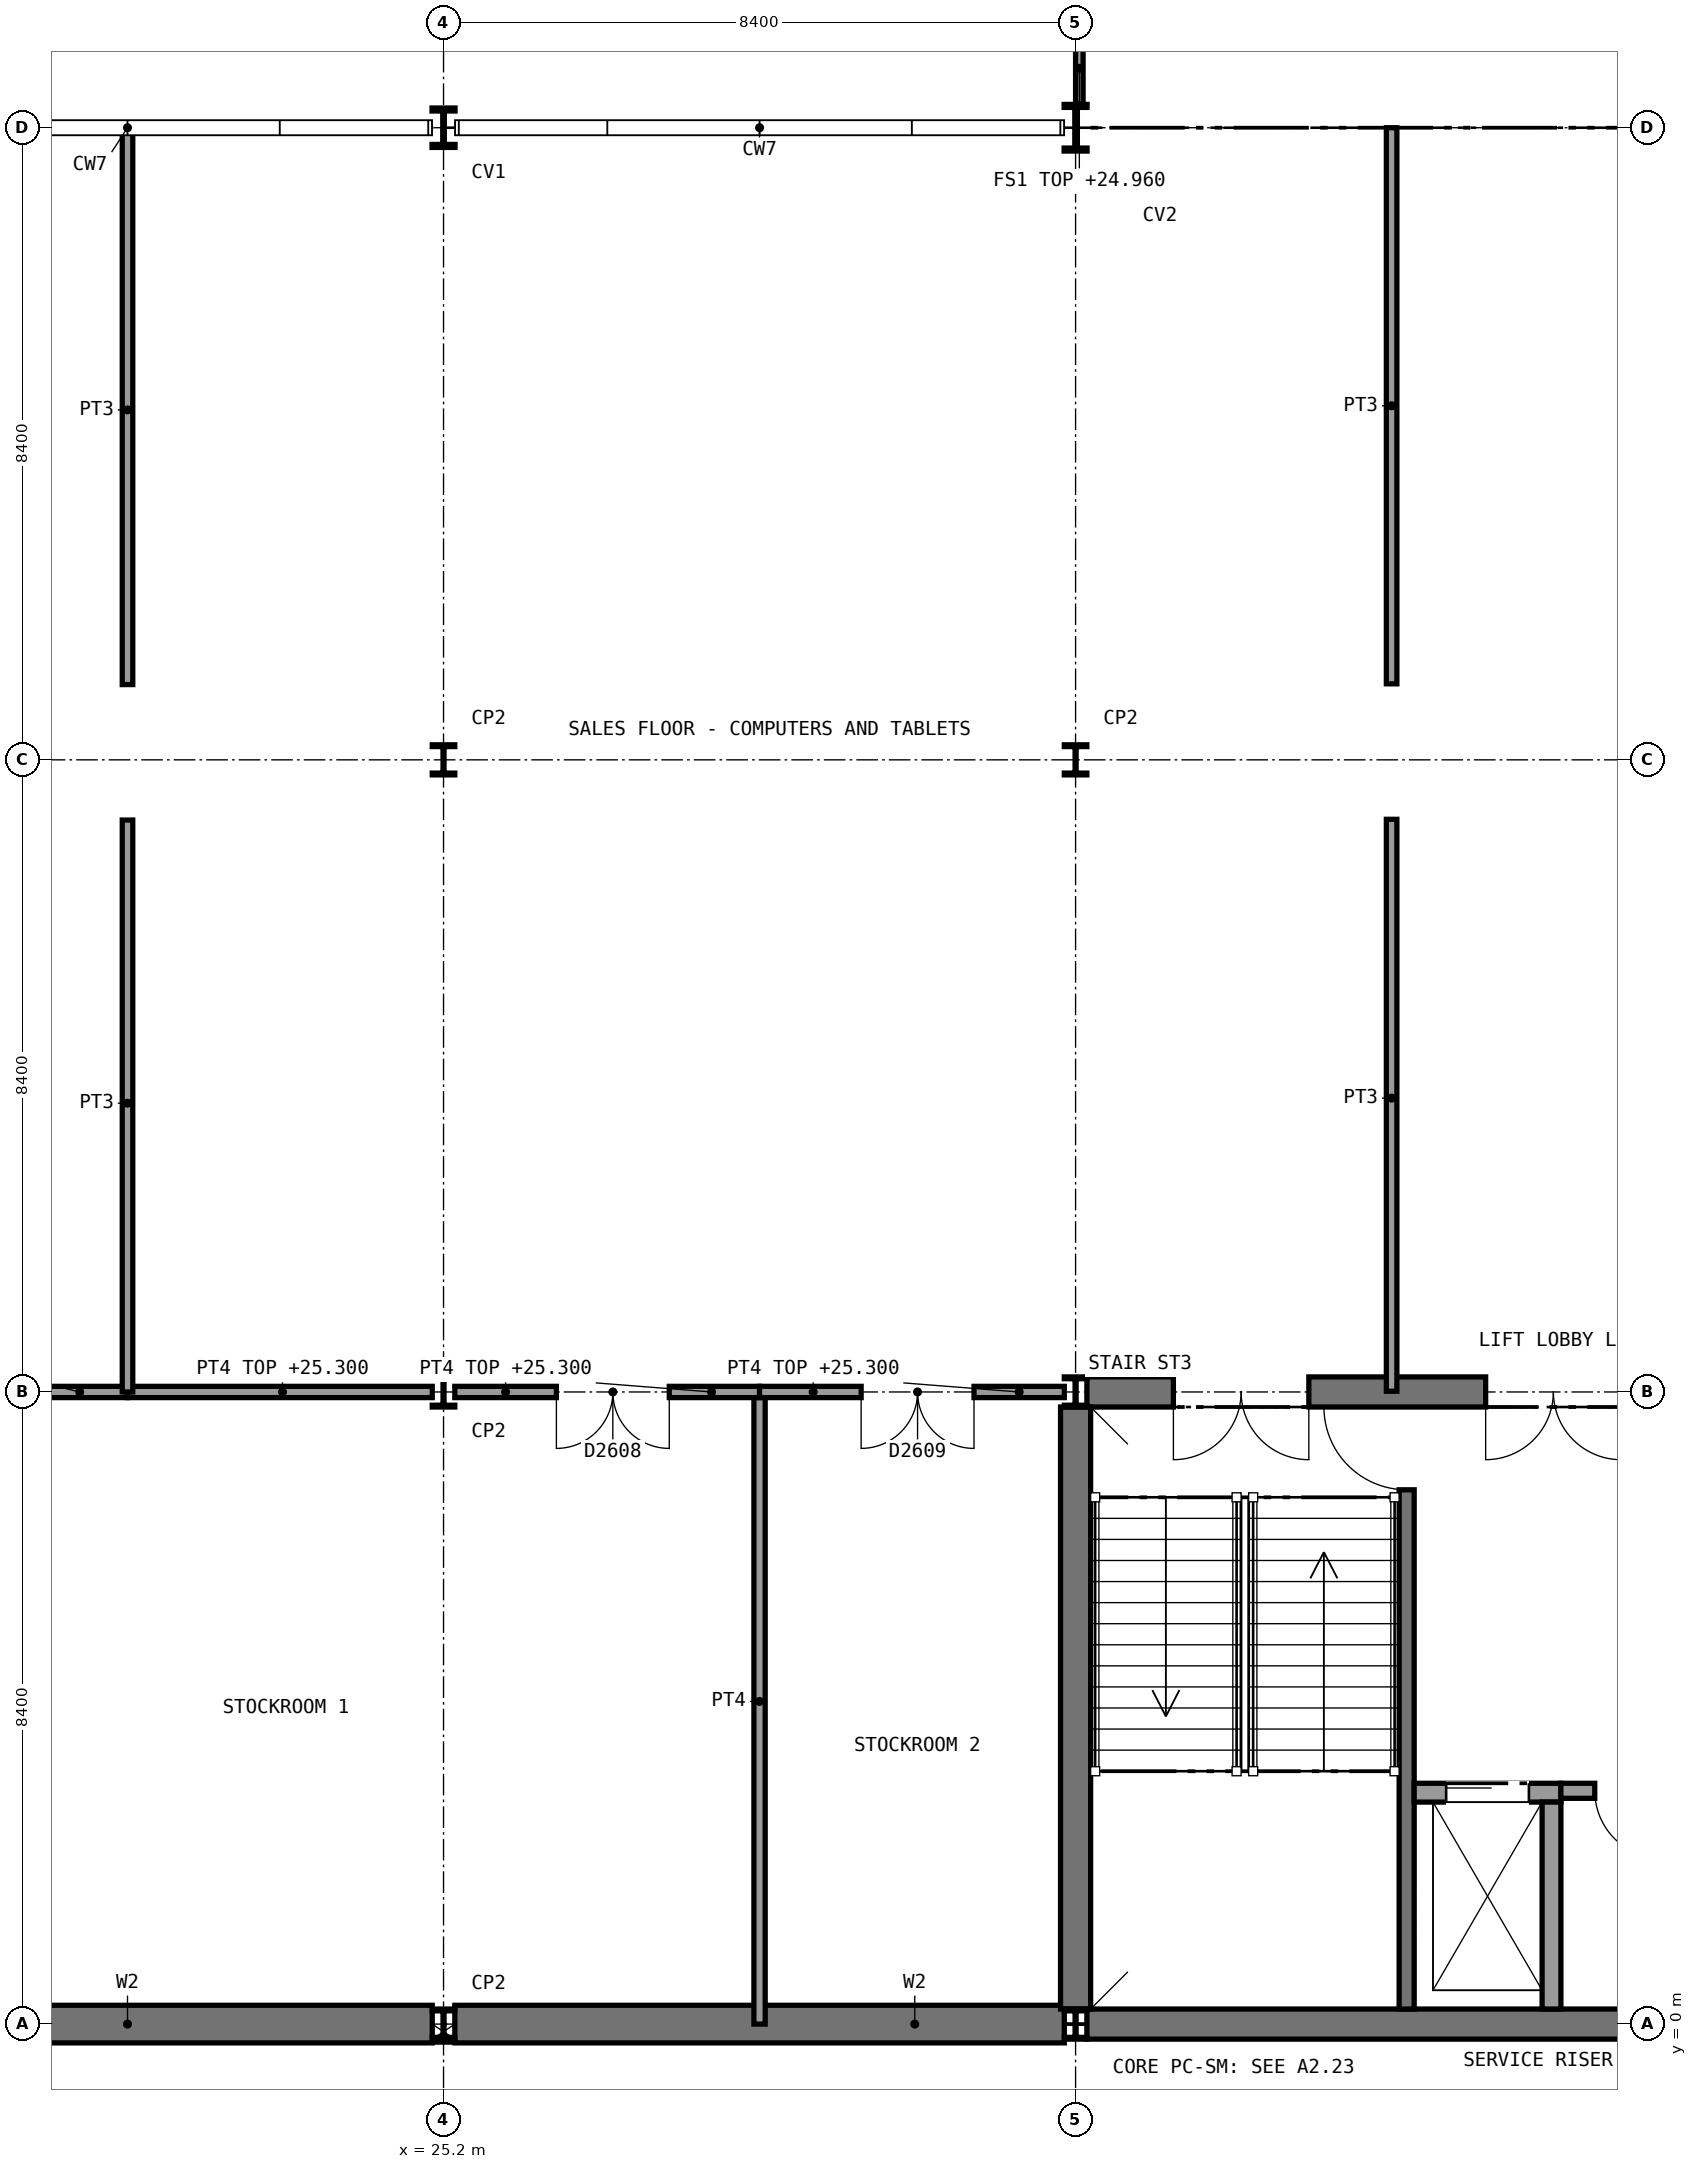
"""IFC4 building model, lengths in metres.
Left out: names, types, materials, properties, quantities, classifications, styles, units other than length and angle.
Written with IfcOpenShell. Run it as: python <this file> out.ifc"""

import sys

from ifc_helpers import new_model, si_unit, direction, frame, frame_2d, origin, origin_2d, place, context, subcontext, project, spatial, rectangle, i_section, extrude, element, fill, save


model = new_model("IFC4")
c1 = context("Model", 3, precision=1e-05, world=origin(), true_north=direction((0.0, 1.0)))
c2 = subcontext(c1, "Body", "Model", "MODEL_VIEW")
j1 = project(units=[si_unit("LENGTHUNIT", "METRE"), si_unit("PLANEANGLEUNIT", "RADIAN")], contexts=[c1])
p1 = place(None, origin())
s1 = spatial("IfcSite", under=j1, at=p1, CompositionType="ELEMENT")
p2 = place(p1, origin())
s2 = spatial("IfcBuilding", under=s1, at=p2, CompositionType="ELEMENT")
p3 = place(p2, frame((0.0, 0.0, 21.0)))
s3 = spatial("IfcBuildingStorey", under=s2, at=p3, CompositionType="ELEMENT", Elevation=21.0)
p4 = place(p3, frame((16.95, 0.0, 0.0), z_axis=(0.0, 0.0, 1.0), x_axis=(1.0, 0.0, 0.0)))
e1 = element("IfcWall", 1, at=p4, inside=s3, PredefinedType="SHEAR", context=c2, shape_type="SweptSolid", body=[
    extrude(rectangle(XDim=8.1, YDim=0.5, at=frame_2d((4.05, 0.0))), origin(), (0.0, 0.0, 1.0), 4.65),
])
p5 = place(p3, frame((25.35, 0.0, 0.0), z_axis=(0.0, 0.0, 1.0), x_axis=(1.0, 0.0, 0.0)))
e2 = element("IfcWall", 2, at=p5, inside=s3, PredefinedType="SHEAR", context=c2, shape_type="SweptSolid", body=[
    extrude(rectangle(XDim=8.1, YDim=0.5, at=frame_2d((4.05, 0.0))), origin(), (0.0, 0.0, 1.0), 4.65),
])
p6 = place(p3, frame((33.75, 0.0, 0.0), z_axis=(0.0, 0.0, 1.0), x_axis=(1.0, 0.0, 0.0)))
e3 = element("IfcWall", 3, at=p6, inside=s3, PredefinedType="SHEAR", context=c2, shape_type="SweptSolid", body=[
    extrude(rectangle(XDim=8.1, YDim=0.4, at=frame_2d((4.05, 0.0))), origin(), (0.0, 0.0, 1.0), 4.65),
])
p7 = place(p3, frame((33.75, 8.4, 0.0), z_axis=(0.0, 0.0, 1.0), x_axis=(1.0, 0.0, 0.0)))
e4 = element("IfcWall", 4, at=p7, inside=s3, PredefinedType="SHEAR", context=c2, shape_type="SweptSolid", body=[
    extrude(rectangle(XDim=8.1, YDim=0.4, at=frame_2d((4.05, 0.0))), origin(), (0.0, 0.0, 1.0), 4.65),
])
p8 = place(p7, frame((1.15, 0.0, 0.0)))
e5 = element("IfcOpeningElement", 5, at=p8, cuts=e4, PredefinedType="OPENING", context=c2, shape_type="SweptSolid", body=[
    extrude(rectangle(XDim=1.8, YDim=2.1, at=frame_2d((0.9, 1.05))), frame((0.0, 0.21, 0.0), z_axis=(0.0, -1.0, 0.0), x_axis=(1.0, 0.0, 0.0)), (0.0, 0.0, 1.0), 0.42),
])
p9 = place(p7, frame((5.3, 0.0, 0.0)))
e6 = element("IfcOpeningElement", 6, at=p9, cuts=e4, PredefinedType="OPENING", context=c2, shape_type="SweptSolid", body=[
    extrude(rectangle(XDim=1.8, YDim=2.1, at=frame_2d((0.9, 1.05))), frame((0.0, 0.21, 0.0), z_axis=(0.0, -1.0, 0.0), x_axis=(1.0, 0.0, 0.0)), (0.0, 0.0, 1.0), 0.42),
])
p10 = place(p3, frame((33.6, 0.2, 0.0), z_axis=(0.0, 0.0, 1.0), x_axis=(0.0, 1.0, 0.0)))
e7 = element("IfcWall", 7, at=p10, inside=s3, PredefinedType="SHEAR", context=c2, shape_type="SweptSolid", body=[
    extrude(rectangle(XDim=8.0, YDim=0.4, at=frame_2d((4.0, 0.0))), origin(), (0.0, 0.0, 1.0), 4.65),
])
for number, where, z_axis, x_axis in (
    (8, (25.2, 0.0, 0.0), (0.0, 0.0, 1.0), (1.0, 0.0, 0.0)),
    (9, (25.2, 8.4, 0.0), (0.0, 0.0, 1.0), (1.0, 0.0, 0.0)),
    (10, (25.2, 16.8, 0.0), (0.0, 0.0, 1.0), (1.0, 0.0, 0.0)),
):
    element("IfcColumn", number, at=place(p3, frame(where, z_axis=z_axis, x_axis=x_axis)), inside=s3, PredefinedType="COLUMN", context=c2, shape_type="SweptSolid", body=[
        extrude(i_section(OverallWidth=0.3, OverallDepth=0.4, WebThickness=0.013, FlangeThickness=0.024, FilletRadius=0.027, at=origin_2d()), origin(), (0.0, 0.0, 1.0), 4.8),
    ])
p11 = place(p3, frame((25.2, 25.2, 0.0), z_axis=(0.0, 0.0, 1.0), x_axis=(1.0, 0.0, 0.0)))
e11 = element("IfcColumn", 11, at=p11, inside=s3, PredefinedType="COLUMN", context=c2, shape_type="SweptSolid", body=[
    extrude(i_section(OverallWidth=0.306, OverallDepth=0.524, WebThickness=0.021, FlangeThickness=0.04, FilletRadius=0.027, at=origin_2d()), origin(), (0.0, 0.0, 1.0), 4.8),
])
for number, where, z_axis, x_axis in (
    (12, (33.6, 0.0, 0.0), (0.0, 0.0, 1.0), (1.0, 0.0, 0.0)),
    (13, (33.6, 8.4, 0.0), (0.0, 0.0, 1.0), (1.0, 0.0, 0.0)),
    (14, (33.6, 16.8, 0.0), (0.0, 0.0, 1.0), (1.0, 0.0, 0.0)),
):
    element("IfcColumn", number, at=place(p3, frame(where, z_axis=z_axis, x_axis=x_axis)), inside=s3, PredefinedType="COLUMN", context=c2, shape_type="SweptSolid", body=[
        extrude(i_section(OverallWidth=0.3, OverallDepth=0.4, WebThickness=0.013, FlangeThickness=0.024, FilletRadius=0.027, at=origin_2d()), origin(), (0.0, 0.0, 1.0), 4.8),
    ])
p12 = place(p3, frame((33.6, 25.2, 0.0), z_axis=(0.0, 0.0, 1.0), x_axis=(1.0, 0.0, 0.0)))
e15 = element("IfcColumn", 15, at=p12, inside=s3, PredefinedType="COLUMN", context=c2, shape_type="SweptSolid", body=[
    extrude(i_section(OverallWidth=0.305, OverallDepth=0.62, WebThickness=0.021, FlangeThickness=0.04, FilletRadius=0.027, at=origin_2d()), origin(), (0.0, 0.0, 1.0), 4.8),
])
p13 = place(p3, frame((29.4, 0.0, 0.0), z_axis=(0.0, 0.0, 1.0), x_axis=(0.0, 1.0, 0.0)))
e16 = element("IfcWall", 16, at=p13, inside=s3, PredefinedType="SOLIDWALL", context=c2, shape_type="SweptSolid", body=[
    extrude(rectangle(XDim=8.4, YDim=0.15, at=frame_2d((4.2, 0.0))), origin(), (0.0, 0.0, 1.0), 4.65),
])
p14 = place(p3, frame((16.95, 8.4, 0.0), z_axis=(0.0, 0.0, 1.0), x_axis=(1.0, 0.0, 0.0)))
e17 = element("IfcWall", 17, at=p14, inside=s3, PredefinedType="SOLIDWALL", context=c2, shape_type="SweptSolid", body=[
    extrude(rectangle(XDim=4.05, YDim=0.15, at=frame_2d((2.025, 0.0))), origin(), (0.0, 0.0, 1.0), 4.3),
])
p15 = place(p14, frame((1.35, 0.0, 0.0)))
e18 = element("IfcOpeningElement", 18, at=p15, cuts=e17, PredefinedType="OPENING", context=c2, shape_type="SweptSolid", body=[
    extrude(rectangle(XDim=1.5, YDim=2.1, at=frame_2d((0.75, 1.05))), frame((0.0, 0.085, 0.0), z_axis=(0.0, -1.0, 0.0), x_axis=(1.0, 0.0, 0.0)), (0.0, 0.0, 1.0), 0.17),
])
p16 = place(p3, frame((21.0, 8.4, 0.0), z_axis=(0.0, 0.0, 1.0), x_axis=(1.0, 0.0, 0.0)))
e19 = element("IfcWall", 19, at=p16, inside=s3, PredefinedType="SOLIDWALL", context=c2, shape_type="SweptSolid", body=[
    extrude(rectangle(XDim=4.05, YDim=0.15, at=frame_2d((2.025, 0.0))), origin(), (0.0, 0.0, 1.0), 4.3),
])
p17 = place(p3, frame((25.35, 8.4, 0.0), z_axis=(0.0, 0.0, 1.0), x_axis=(1.0, 0.0, 0.0)))
e20 = element("IfcWall", 20, at=p17, inside=s3, PredefinedType="SOLIDWALL", context=c2, shape_type="SweptSolid", body=[
    extrude(rectangle(XDim=4.05, YDim=0.15, at=frame_2d((2.025, 0.0))), origin(), (0.0, 0.0, 1.0), 4.3),
])
p18 = place(p17, frame((1.35, 0.0, 0.0)))
e21 = element("IfcOpeningElement", 21, at=p18, cuts=e20, PredefinedType="OPENING", context=c2, shape_type="SweptSolid", body=[
    extrude(rectangle(XDim=1.5, YDim=2.1, at=frame_2d((0.75, 1.05))), frame((0.0, 0.085, 0.0), z_axis=(0.0, -1.0, 0.0), x_axis=(1.0, 0.0, 0.0)), (0.0, 0.0, 1.0), 0.17),
])
p19 = place(p3, frame((29.4, 8.4, 0.0), z_axis=(0.0, 0.0, 1.0), x_axis=(1.0, 0.0, 0.0)))
e22 = element("IfcWall", 22, at=p19, inside=s3, PredefinedType="SOLIDWALL", context=c2, shape_type="SweptSolid", body=[
    extrude(rectangle(XDim=4.05, YDim=0.15, at=frame_2d((2.025, 0.0))), origin(), (0.0, 0.0, 1.0), 4.3),
])
p20 = place(p19, frame((1.35, 0.0, 0.0)))
e23 = element("IfcOpeningElement", 23, at=p20, cuts=e22, PredefinedType="OPENING", context=c2, shape_type="SweptSolid", body=[
    extrude(rectangle(XDim=1.5, YDim=2.1, at=frame_2d((0.75, 1.05))), frame((0.0, 0.085, 0.0), z_axis=(0.0, -1.0, 0.0), x_axis=(1.0, 0.0, 0.0)), (0.0, 0.0, 1.0), 0.17),
])
p21 = place(p3, frame((21.0, 8.4, 0.0), z_axis=(0.0, 0.0, 1.0), x_axis=(0.0, 1.0, 0.0)))
e24 = element("IfcWall", 24, at=p21, inside=s3, PredefinedType="PARTITIONING", context=c2, shape_type="SweptSolid", body=[
    extrude(rectangle(XDim=7.6, YDim=0.14, at=frame_2d((3.8, 0.0))), origin(), (0.0, 0.0, 1.0), 4.65),
])
p22 = place(p3, frame((21.0, 17.8, 0.0), z_axis=(0.0, 0.0, 1.0), x_axis=(0.0, 1.0, 0.0)))
e25 = element("IfcWall", 25, at=p22, inside=s3, PredefinedType="PARTITIONING", context=c2, shape_type="SweptSolid", body=[
    extrude(rectangle(XDim=7.4, YDim=0.14, at=frame_2d((3.7, 0.0))), origin(), (0.0, 0.0, 1.0), 4.65),
])
p23 = place(p3, frame((37.8, 8.41, 0.0), z_axis=(0.0, 0.0, 1.0), x_axis=(0.0, 1.0, 0.0)))
e26 = element("IfcWall", 26, at=p23, inside=s3, PredefinedType="PARTITIONING", context=c2, shape_type="SweptSolid", body=[
    extrude(rectangle(XDim=7.6, YDim=0.14, at=frame_2d((3.8, 0.0))), origin(), (0.0, 0.0, 1.0), 4.65),
])
p24 = place(p3, frame((37.8, 17.81, 0.0), z_axis=(0.0, 0.0, 1.0), x_axis=(0.0, 1.0, 0.0)))
e27 = element("IfcWall", 27, at=p24, inside=s3, PredefinedType="PARTITIONING", context=c2, shape_type="SweptSolid", body=[
    extrude(rectangle(XDim=7.39, YDim=0.14, at=frame_2d((3.695, 0.0))), origin(), (0.0, 0.0, 1.0), 4.65),
])
p25 = place(p3, frame((38.0, 0.2, 0.0), z_axis=(0.0, 0.0, 1.0), x_axis=(0.0, 1.0, 0.0)))
e28 = element("IfcWall", 28, at=p25, inside=s3, PredefinedType="SHEAR", context=c2, shape_type="SweptSolid", body=[
    extrude(rectangle(XDim=8.0, YDim=0.2, at=frame_2d((4.0, 0.0))), origin(), (0.0, 0.0, 1.0), 4.65),
])
p26 = place(p25, frame((6.9, 0.0, 0.0)))
e29 = element("IfcOpeningElement", 29, at=p26, cuts=e28, PredefinedType="OPENING", context=c2, shape_type="SweptSolid", body=[
    extrude(rectangle(XDim=1.11, YDim=2.1, at=frame_2d((0.555, 1.05))), frame((0.0, 0.11, 0.0), z_axis=(0.0, -1.0, 0.0), x_axis=(1.0, 0.0, 0.0)), (0.0, 0.0, 1.0), 0.22),
])
p27 = place(p3, frame((38.1, 3.075, 0.0), z_axis=(0.0, 0.0, 1.0), x_axis=(1.0, 0.0, 0.0)))
e30 = element("IfcWall", 30, at=p27, inside=s3, PredefinedType="SOLIDWALL", context=c2, shape_type="SweptSolid", body=[
    extrude(rectangle(XDim=1.95, YDim=0.25, at=frame_2d((0.975, 0.0))), origin(), (0.0, 0.0, 1.0), 4.8),
])
p28 = place(p27, frame((0.425, 0.0, 0.0)))
e31 = element("IfcOpeningElement", 31, at=p28, cuts=e30, PredefinedType="OPENING", context=c2, shape_type="SweptSolid", body=[
    extrude(rectangle(XDim=1.1, YDim=2.1, at=frame_2d((0.55, 1.05))), frame((0.0, 0.135, 0.0), z_axis=(0.0, -1.0, 0.0), x_axis=(1.0, 0.0, 0.0)), (0.0, 0.0, 1.0), 0.27),
])
p29 = place(p3, frame((39.925, 0.2, 0.0), z_axis=(0.0, 0.0, 1.0), x_axis=(0.0, 1.0, 0.0)))
e32 = element("IfcWall", 32, at=p29, inside=s3, PredefinedType="SOLIDWALL", context=c2, shape_type="SweptSolid", body=[
    extrude(rectangle(XDim=2.75, YDim=0.25, at=frame_2d((1.375, 0.0))), origin(), (0.0, 0.0, 1.0), 4.8),
])
p30 = place(p3, frame((40.05, 3.1, 0.0), z_axis=(0.0, 0.0, 1.0), x_axis=(1.0, 0.0, 0.0)))
e33 = element("IfcWall", 33, at=p30, inside=s3, PredefinedType="PARTITIONING", context=c2, shape_type="SweptSolid", body=[
    extrude(rectangle(XDim=1.75, YDim=0.2, at=frame_2d((0.875, 0.0))), origin(), (0.0, 0.0, 1.0), 4.65),
])
p31 = place(p30, frame((0.45, 0.0, 0.0)))
e34 = element("IfcOpeningElement", 34, at=p31, cuts=e33, PredefinedType="OPENING", context=c2, shape_type="SweptSolid", body=[
    extrude(rectangle(XDim=0.9, YDim=2.1, at=frame_2d((0.45, 1.05))), frame((0.0, 0.11, 0.0), z_axis=(0.0, -1.0, 0.0), x_axis=(1.0, 0.0, 0.0)), (0.0, 0.0, 1.0), 0.22),
])
p32 = place(p3, frame((33.65, 25.51, 0.0), z_axis=(0.0, 0.0, 1.0), x_axis=(0.0, 1.0, 0.0)))
e35 = element("IfcWall", 35, at=p32, inside=s3, PredefinedType="PARTITIONING", context=c2, shape_type="SweptSolid", body=[
    extrude(rectangle(XDim=11.98, YDim=0.1, at=frame_2d((5.99, 0.0))), origin(), (0.0, 0.0, 1.0), 3.96),
])
p33 = place(p18, frame((1.5, 0.0, 0.0), z_axis=(0.0, 0.0, 1.0), x_axis=(-1.0, 0.0, 0.0)))
e36 = element("IfcDoor", 36, at=p33, inside=s3, OperationType="DOUBLE_DOOR_SINGLE_SWING", PredefinedType="DOOR", context=c2, shape_type="SweptSolid", body=[
    extrude(rectangle(XDim=1.5, YDim=2.1, at=frame_2d((0.75, 1.05))), frame((0.0, 0.025, 0.0), z_axis=(0.0, -1.0, 0.0), x_axis=(1.0, 0.0, 0.0)), (0.0, 0.0, 1.0), 0.05),
])
fill(e21, e36)
p34 = place(p20, frame((1.5, 0.0, 0.0), z_axis=(0.0, 0.0, 1.0), x_axis=(-1.0, 0.0, 0.0)))
e37 = element("IfcDoor", 37, at=p34, inside=s3, OperationType="DOUBLE_DOOR_SINGLE_SWING", PredefinedType="DOOR", context=c2, shape_type="SweptSolid", body=[
    extrude(rectangle(XDim=1.5, YDim=2.1, at=frame_2d((0.75, 1.05))), frame((0.0, 0.025, 0.0), z_axis=(0.0, -1.0, 0.0), x_axis=(1.0, 0.0, 0.0)), (0.0, 0.0, 1.0), 0.05),
])
fill(e23, e37)
p35 = place(p26, origin())
e38 = element("IfcDoor", 38, at=p35, inside=s3, OperationType="SINGLE_SWING_RIGHT", PredefinedType="DOOR", context=c2, shape_type="SweptSolid", body=[
    extrude(rectangle(XDim=1.1, YDim=2.1, at=frame_2d((0.55, 1.05))), frame((0.0, 0.025, 0.0), z_axis=(0.0, -1.0, 0.0), x_axis=(1.0, 0.0, 0.0)), (0.0, 0.0, 1.0), 0.05),
])
fill(e29, e38)
p36 = place(p28, origin())
e39 = element("IfcDoor", 39, at=p36, inside=s3, OperationType="SLIDING_TO_LEFT", PredefinedType="DOOR", context=c2, shape_type="SweptSolid", body=[
    extrude(rectangle(XDim=1.1, YDim=2.1, at=frame_2d((0.55, 1.05))), frame((0.0, 0.025, 0.0), z_axis=(0.0, -1.0, 0.0), x_axis=(1.0, 0.0, 0.0)), (0.0, 0.0, 1.0), 0.05),
])
fill(e31, e39)
p37 = place(p31, frame((0.9, 0.0, 0.0), z_axis=(0.0, 0.0, 1.0), x_axis=(-1.0, 0.0, 0.0)))
e40 = element("IfcDoor", 40, at=p37, inside=s3, OperationType="SINGLE_SWING_LEFT", PredefinedType="DOOR", context=c2, shape_type="SweptSolid", body=[
    extrude(rectangle(XDim=0.9, YDim=2.1, at=frame_2d((0.45, 1.05))), frame((0.0, 0.025, 0.0), z_axis=(0.0, -1.0, 0.0), x_axis=(1.0, 0.0, 0.0)), (0.0, 0.0, 1.0), 0.05),
])
fill(e34, e40)
p38 = place(p8, frame((1.8, 0.0, 0.0), z_axis=(0.0, 0.0, 1.0), x_axis=(-1.0, 0.0, 0.0)))
e41 = element("IfcDoor", 41, at=p38, inside=s3, OperationType="DOUBLE_DOOR_SINGLE_SWING", PredefinedType="DOOR", context=c2, shape_type="SweptSolid", body=[
    extrude(rectangle(XDim=1.8, YDim=2.1, at=frame_2d((0.9, 1.05))), frame((0.0, 0.025, 0.0), z_axis=(0.0, -1.0, 0.0), x_axis=(1.0, 0.0, 0.0)), (0.0, 0.0, 1.0), 0.05),
])
fill(e5, e41)
p39 = place(p9, frame((1.8, 0.0, 0.0), z_axis=(0.0, 0.0, 1.0), x_axis=(-1.0, 0.0, 0.0)))
e42 = element("IfcDoor", 42, at=p39, inside=s3, OperationType="DOUBLE_DOOR_SINGLE_SWING", PredefinedType="DOOR", context=c2, shape_type="SweptSolid", body=[
    extrude(rectangle(XDim=1.8, YDim=2.1, at=frame_2d((0.9, 1.05))), frame((0.0, 0.025, 0.0), z_axis=(0.0, -1.0, 0.0), x_axis=(1.0, 0.0, 0.0)), (0.0, 0.0, 1.0), 0.05),
])
fill(e6, e42)
save(model, sys.argv[1])
